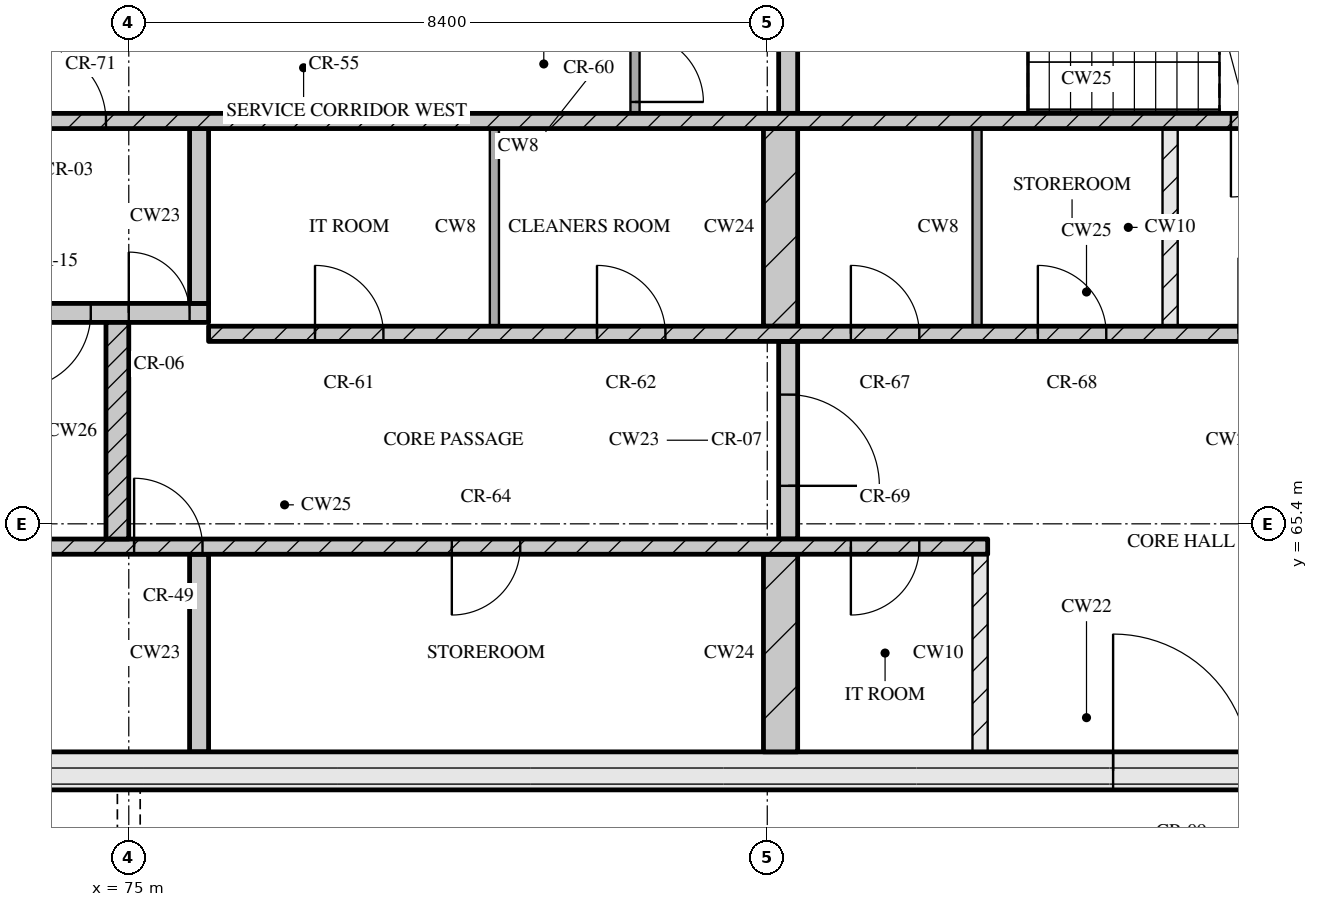
"""IFC4 building model, lengths in metres.
Left out: names, types, materials, properties, quantities, classifications, styles, units other than length and angle.
Written with IfcOpenShell. Run it as: python <this file> out.ifc"""

import sys

from ifc_helpers import new_model, si_unit, direction, frame, frame_2d, origin, place, context, subcontext, project, spatial, rectangle, extrude, element, fill, save


model = new_model("IFC4")
c1 = context("Model", 3, precision=1e-05, world=origin(), true_north=direction((0.0, 1.0)))
c2 = subcontext(c1, "Body", "Model", "MODEL_VIEW")
j1 = project(units=[si_unit("LENGTHUNIT", "METRE"), si_unit("PLANEANGLEUNIT", "RADIAN")], contexts=[c1])
p1 = place(None, origin())
s1 = spatial("IfcSite", under=j1, at=p1, CompositionType="ELEMENT")
p2 = place(p1, origin())
s2 = spatial("IfcBuilding", under=s1, at=p2, CompositionType="ELEMENT")
p3 = place(p2, frame((0.0, 0.0, 263.55)))
s3 = spatial("IfcBuildingStorey", under=s2, at=p3, CompositionType="ELEMENT", Elevation=263.55)
p4 = place(p3, frame((67.3, 62.15, 0.0), z_axis=(0.0, 0.0, 1.0), x_axis=(1.0, 0.0, 0.0)))
e1 = element("IfcWall", 1, at=p4, inside=s3, PredefinedType="SOLIDWALL", context=c2, shape_type="SweptSolid", body=[
    extrude(rectangle(XDim=40.6, YDim=0.5, at=frame_2d((20.3, 0.0))), origin(), (0.0, 0.0, 1.0), 3.32),
])
p5 = place(p4, frame((20.65, 0.0, 0.0)))
e2 = element("IfcOpeningElement", 2, at=p5, cuts=e1, PredefinedType="OPENING", context=c2, shape_type="SweptSolid", body=[
    extrude(rectangle(XDim=1.8, YDim=2.1, at=frame_2d((0.9, 1.05))), frame((0.0, 0.26, 0.0), z_axis=(0.0, -1.0, 0.0), x_axis=(1.0, 0.0, 0.0)), (0.0, 0.0, 1.0), 0.52),
])
p6 = place(p3, frame((75.925, 62.4, 0.0), z_axis=(0.0, 0.0, 1.0), x_axis=(0.0, 1.0, 0.0)))
e3 = element("IfcWall", 3, at=p6, inside=s3, PredefinedType="SOLIDWALL", context=c2, shape_type="SweptSolid", body=[
    extrude(rectangle(XDim=2.6, YDim=0.25, at=frame_2d((1.3, 0.0))), origin(), (0.0, 0.0, 1.0), 3.32),
])
p7 = place(p3, frame((83.575, 62.4, 0.0), z_axis=(0.0, 0.0, 1.0), x_axis=(0.0, 1.0, 0.0)))
e4 = element("IfcWall", 4, at=p7, inside=s3, PredefinedType="SOLIDWALL", context=c2, shape_type="SweptSolid", body=[
    extrude(rectangle(XDim=2.6, YDim=0.45, at=frame_2d((1.3, 0.0))), origin(), (0.0, 0.0, 1.0), 3.32),
])
p8 = place(p3, frame((86.2, 62.4, 0.0), z_axis=(0.0, 0.0, 1.0), x_axis=(0.0, 1.0, 0.0)))
e5 = element("IfcWall", 5, at=p8, inside=s3, PredefinedType="PARTITIONING", context=c2, shape_type="SweptSolid", body=[
    extrude(rectangle(XDim=2.6, YDim=0.2, at=frame_2d((1.3, 0.0))), origin(), (0.0, 0.0, 1.0), 3.32),
])
p9 = place(p3, frame((67.8, 65.1, 0.0), z_axis=(0.0, 0.0, 1.0), x_axis=(1.0, 0.0, 0.0)))
e6 = element("IfcWall", 6, at=p9, inside=s3, PredefinedType="SOLIDWALL", context=c2, shape_type="SweptSolid", body=[
    extrude(rectangle(XDim=18.5, YDim=0.2, at=frame_2d((9.25, 0.0))), origin(), (0.0, 0.0, 1.0), 3.32),
])
p10 = place(p9, frame((7.27, 0.0, 0.0)))
e7 = element("IfcOpeningElement", 7, at=p10, cuts=e6, PredefinedType="OPENING", context=c2, shape_type="SweptSolid", body=[
    extrude(rectangle(XDim=0.9, YDim=2.1, at=frame_2d((0.45, 1.05))), frame((0.0, 0.11, 0.0), z_axis=(0.0, -1.0, 0.0), x_axis=(1.0, 0.0, 0.0)), (0.0, 0.0, 1.0), 0.22),
])
p11 = place(p9, frame((11.45, 0.0, 0.0)))
e8 = element("IfcOpeningElement", 8, at=p11, cuts=e6, PredefinedType="OPENING", context=c2, shape_type="SweptSolid", body=[
    extrude(rectangle(XDim=0.9, YDim=2.1, at=frame_2d((0.45, 1.05))), frame((0.0, 0.11, 0.0), z_axis=(0.0, -1.0, 0.0), x_axis=(1.0, 0.0, 0.0)), (0.0, 0.0, 1.0), 0.22),
])
p12 = place(p9, frame((16.7, 0.0, 0.0)))
e9 = element("IfcOpeningElement", 9, at=p12, cuts=e6, PredefinedType="OPENING", context=c2, shape_type="SweptSolid", body=[
    extrude(rectangle(XDim=0.9, YDim=2.1, at=frame_2d((0.45, 1.05))), frame((0.0, 0.11, 0.0), z_axis=(0.0, -1.0, 0.0), x_axis=(1.0, 0.0, 0.0)), (0.0, 0.0, 1.0), 0.22),
])
p13 = place(p3, frame((74.85, 65.2, 0.0), z_axis=(0.0, 0.0, 1.0), x_axis=(0.0, 1.0, 0.0)))
e10 = element("IfcWall", 10, at=p13, inside=s3, PredefinedType="SOLIDWALL", context=c2, shape_type="SweptSolid", body=[
    extrude(rectangle(XDim=2.85, YDim=0.3, at=frame_2d((1.425, 0.0))), origin(), (0.0, 0.0, 1.0), 3.32),
])
p14 = place(p3, frame((83.675, 65.2, 0.0), z_axis=(0.0, 0.0, 1.0), x_axis=(0.0, 1.0, 0.0)))
e11 = element("IfcWall", 11, at=p14, inside=s3, PredefinedType="SOLIDWALL", context=c2, shape_type="SweptSolid", body=[
    extrude(rectangle(XDim=2.6, YDim=0.25, at=frame_2d((1.3, 0.0))), origin(), (0.0, 0.0, 1.0), 3.32),
])
p15 = place(p14, frame((0.7, 0.0, 0.0)))
e12 = element("IfcOpeningElement", 12, at=p15, cuts=e11, PredefinedType="OPENING", context=c2, shape_type="SweptSolid", body=[
    extrude(rectangle(XDim=1.2, YDim=2.1, at=frame_2d((0.6, 1.05))), frame((0.0, 0.135, 0.0), z_axis=(0.0, -1.0, 0.0), x_axis=(1.0, 0.0, 0.0)), (0.0, 0.0, 1.0), 0.27),
])
p16 = place(p3, frame((76.05, 67.9, 0.0), z_axis=(0.0, 0.0, 1.0), x_axis=(1.0, 0.0, 0.0)))
e13 = element("IfcWall", 13, at=p16, inside=s3, PredefinedType="SOLIDWALL", context=c2, shape_type="SweptSolid", body=[
    extrude(rectangle(XDim=23.1, YDim=0.2, at=frame_2d((11.55, 0.0))), origin(), (0.0, 0.0, 1.0), 3.32),
])
p17 = place(p16, frame((1.4, 0.0, 0.0)))
e14 = element("IfcOpeningElement", 14, at=p17, cuts=e13, PredefinedType="OPENING", context=c2, shape_type="SweptSolid", body=[
    extrude(rectangle(XDim=0.9, YDim=2.1, at=frame_2d((0.45, 1.05))), frame((0.0, 0.11, 0.0), z_axis=(0.0, -1.0, 0.0), x_axis=(1.0, 0.0, 0.0)), (0.0, 0.0, 1.0), 0.22),
])
p18 = place(p16, frame((5.11, 0.0, 0.0)))
e15 = element("IfcOpeningElement", 15, at=p18, cuts=e13, PredefinedType="OPENING", context=c2, shape_type="SweptSolid", body=[
    extrude(rectangle(XDim=0.9, YDim=2.1, at=frame_2d((0.45, 1.05))), frame((0.0, 0.11, 0.0), z_axis=(0.0, -1.0, 0.0), x_axis=(1.0, 0.0, 0.0)), (0.0, 0.0, 1.0), 0.22),
])
p19 = place(p16, frame((8.45, 0.0, 0.0)))
e16 = element("IfcOpeningElement", 16, at=p19, cuts=e13, PredefinedType="OPENING", context=c2, shape_type="SweptSolid", body=[
    extrude(rectangle(XDim=0.9, YDim=2.1, at=frame_2d((0.45, 1.05))), frame((0.0, 0.11, 0.0), z_axis=(0.0, -1.0, 0.0), x_axis=(1.0, 0.0, 0.0)), (0.0, 0.0, 1.0), 0.22),
])
p20 = place(p16, frame((10.91, 0.0, 0.0)))
e17 = element("IfcOpeningElement", 17, at=p20, cuts=e13, PredefinedType="OPENING", context=c2, shape_type="SweptSolid", body=[
    extrude(rectangle(XDim=0.9, YDim=2.1, at=frame_2d((0.45, 1.05))), frame((0.0, 0.11, 0.0), z_axis=(0.0, -1.0, 0.0), x_axis=(1.0, 0.0, 0.0)), (0.0, 0.0, 1.0), 0.22),
])
p21 = place(p16, frame((13.55, 0.0, 0.0)))
e18 = element("IfcOpeningElement", 18, at=p21, cuts=e13, PredefinedType="OPENING", context=c2, shape_type="SweptSolid", body=[
    extrude(rectangle(XDim=1.0, YDim=2.1, at=frame_2d((0.5, 1.05))), frame((0.0, 0.11, 0.0), z_axis=(0.0, -1.0, 0.0), x_axis=(1.0, 0.0, 0.0)), (0.0, 0.0, 1.0), 0.22),
])
p22 = place(p16, frame((16.2, 0.0, 0.0)))
e19 = element("IfcOpeningElement", 19, at=p22, cuts=e13, PredefinedType="OPENING", context=c2, shape_type="SweptSolid", body=[
    extrude(rectangle(XDim=1.1, YDim=2.1, at=frame_2d((0.55, 1.05))), frame((0.0, 0.11, 0.0), z_axis=(0.0, -1.0, 0.0), x_axis=(1.0, 0.0, 0.0)), (0.0, 0.0, 1.0), 0.22),
])
p23 = place(p16, frame((18.7, 0.0, 0.0)))
e20 = element("IfcOpeningElement", 20, at=p23, cuts=e13, PredefinedType="OPENING", context=c2, shape_type="SweptSolid", body=[
    extrude(rectangle(XDim=1.1, YDim=2.1, at=frame_2d((0.55, 1.05))), frame((0.0, 0.11, 0.0), z_axis=(0.0, -1.0, 0.0), x_axis=(1.0, 0.0, 0.0)), (0.0, 0.0, 1.0), 0.22),
])
p24 = place(p16, frame((21.2, 0.0, 0.0)))
e21 = element("IfcOpeningElement", 21, at=p24, cuts=e13, PredefinedType="OPENING", context=c2, shape_type="SweptSolid", body=[
    extrude(rectangle(XDim=1.1, YDim=2.1, at=frame_2d((0.55, 1.05))), frame((0.0, 0.11, 0.0), z_axis=(0.0, -1.0, 0.0), x_axis=(1.0, 0.0, 0.0)), (0.0, 0.0, 1.0), 0.22),
])
p25 = place(p3, frame((79.81, 68.0, 0.0), z_axis=(0.0, 0.0, 1.0), x_axis=(0.0, 1.0, 0.0)))
e22 = element("IfcWall", 22, at=p25, inside=s3, PredefinedType="PARTITIONING", context=c2, shape_type="SweptSolid", body=[
    extrude(rectangle(XDim=2.6, YDim=0.12, at=frame_2d((1.3, 0.0))), origin(), (0.0, 0.0, 1.0), 3.32),
])
p26 = place(p3, frame((83.575, 68.0, 0.0), z_axis=(0.0, 0.0, 1.0), x_axis=(0.0, 1.0, 0.0)))
e23 = element("IfcWall", 23, at=p26, inside=s3, PredefinedType="SOLIDWALL", context=c2, shape_type="SweptSolid", body=[
    extrude(rectangle(XDim=2.6, YDim=0.45, at=frame_2d((1.3, 0.0))), origin(), (0.0, 0.0, 1.0), 3.32),
])
p27 = place(p3, frame((86.16, 68.0, 0.0), z_axis=(0.0, 0.0, 1.0), x_axis=(0.0, 1.0, 0.0)))
e24 = element("IfcWall", 24, at=p27, inside=s3, PredefinedType="PARTITIONING", context=c2, shape_type="SweptSolid", body=[
    extrude(rectangle(XDim=2.6, YDim=0.12, at=frame_2d((1.3, 0.0))), origin(), (0.0, 0.0, 1.0), 3.32),
])
p28 = place(p3, frame((88.7, 68.0, 0.0), z_axis=(0.0, 0.0, 1.0), x_axis=(0.0, 1.0, 0.0)))
e25 = element("IfcWall", 25, at=p28, inside=s3, PredefinedType="PARTITIONING", context=c2, shape_type="SweptSolid", body=[
    extrude(rectangle(XDim=2.6, YDim=0.2, at=frame_2d((1.3, 0.0))), origin(), (0.0, 0.0, 1.0), 3.32),
])
p29 = place(p3, frame((67.8, 68.175, 0.0), z_axis=(0.0, 0.0, 1.0), x_axis=(1.0, 0.0, 0.0)))
e26 = element("IfcWall", 26, at=p29, inside=s3, PredefinedType="SOLIDWALL", context=c2, shape_type="SweptSolid", body=[
    extrude(rectangle(XDim=8.25, YDim=0.25, at=frame_2d((4.125, 0.0))), origin(), (0.0, 0.0, 1.0), 3.32),
])
p30 = place(p29, frame((5.7, 0.0, 0.0)))
e27 = element("IfcOpeningElement", 27, at=p30, cuts=e26, PredefinedType="OPENING", context=c2, shape_type="SweptSolid", body=[
    extrude(rectangle(XDim=1.0, YDim=2.1, at=frame_2d((0.5, 1.05))), frame((0.0, 0.135, 0.0), z_axis=(0.0, -1.0, 0.0), x_axis=(1.0, 0.0, 0.0)), (0.0, 0.0, 1.0), 0.27),
])
p31 = place(p29, frame((7.2, 0.0, 0.0)))
e28 = element("IfcOpeningElement", 28, at=p31, cuts=e26, PredefinedType="OPENING", context=c2, shape_type="SweptSolid", body=[
    extrude(rectangle(XDim=0.8, YDim=2.1, at=frame_2d((0.4, 1.05))), frame((0.0, 0.135, 0.0), z_axis=(0.0, -1.0, 0.0), x_axis=(1.0, 0.0, 0.0)), (0.0, 0.0, 1.0), 0.27),
])
p32 = place(p3, frame((75.925, 68.3, 0.0), z_axis=(0.0, 0.0, 1.0), x_axis=(0.0, 1.0, 0.0)))
e29 = element("IfcWall", 29, at=p32, inside=s3, PredefinedType="SOLIDWALL", context=c2, shape_type="SweptSolid", body=[
    extrude(rectangle(XDim=2.3, YDim=0.25, at=frame_2d((1.15, 0.0))), origin(), (0.0, 0.0, 1.0), 3.32),
])
p33 = place(p3, frame((67.8, 70.7, 0.0), z_axis=(0.0, 0.0, 1.0), x_axis=(1.0, 0.0, 0.0)))
e30 = element("IfcWall", 30, at=p33, inside=s3, PredefinedType="SOLIDWALL", context=c2, shape_type="SweptSolid", body=[
    extrude(rectangle(XDim=39.6, YDim=0.2, at=frame_2d((19.8, 0.0))), origin(), (0.0, 0.0, 1.0), 3.32),
])
p34 = place(p33, frame((0.65, 0.0, 0.0)))
e31 = element("IfcOpeningElement", 31, at=p34, cuts=e30, PredefinedType="OPENING", context=c2, shape_type="SweptSolid", body=[
    extrude(rectangle(XDim=1.1, YDim=2.1, at=frame_2d((0.55, 1.05))), frame((0.0, 0.11, 0.0), z_axis=(0.0, -1.0, 0.0), x_axis=(1.0, 0.0, 0.0)), (0.0, 0.0, 1.0), 0.22),
])
p35 = place(p33, frame((3.25, 0.0, 0.0)))
e32 = element("IfcOpeningElement", 32, at=p35, cuts=e30, PredefinedType="OPENING", context=c2, shape_type="SweptSolid", body=[
    extrude(rectangle(XDim=1.1, YDim=2.1, at=frame_2d((0.55, 1.05))), frame((0.0, 0.11, 0.0), z_axis=(0.0, -1.0, 0.0), x_axis=(1.0, 0.0, 0.0)), (0.0, 0.0, 1.0), 0.22),
])
p36 = place(p33, frame((5.9, 0.0, 0.0)))
e33 = element("IfcOpeningElement", 33, at=p36, cuts=e30, PredefinedType="OPENING", context=c2, shape_type="SweptSolid", body=[
    extrude(rectangle(XDim=1.0, YDim=2.1, at=frame_2d((0.5, 1.05))), frame((0.0, 0.11, 0.0), z_axis=(0.0, -1.0, 0.0), x_axis=(1.0, 0.0, 0.0)), (0.0, 0.0, 1.0), 0.22),
])
p37 = place(p33, frame((21.7, 0.0, 0.0)))
e34 = element("IfcOpeningElement", 34, at=p37, cuts=e30, PredefinedType="OPENING", context=c2, shape_type="SweptSolid", body=[
    extrude(rectangle(XDim=1.0, YDim=2.1, at=frame_2d((0.5, 1.05))), frame((0.0, 0.11, 0.0), z_axis=(0.0, -1.0, 0.0), x_axis=(1.0, 0.0, 0.0)), (0.0, 0.0, 1.0), 0.22),
])
p38 = place(p33, frame((32.7, 0.0, 0.0)))
e35 = element("IfcOpeningElement", 35, at=p38, cuts=e30, PredefinedType="OPENING", context=c2, shape_type="SweptSolid", body=[
    extrude(rectangle(XDim=1.0, YDim=2.1, at=frame_2d((0.5, 1.05))), frame((0.0, 0.11, 0.0), z_axis=(0.0, -1.0, 0.0), x_axis=(1.0, 0.0, 0.0)), (0.0, 0.0, 1.0), 0.22),
])
p39 = place(p33, frame((35.25, 0.0, 0.0)))
e36 = element("IfcOpeningElement", 36, at=p39, cuts=e30, PredefinedType="OPENING", context=c2, shape_type="SweptSolid", body=[
    extrude(rectangle(XDim=1.1, YDim=2.1, at=frame_2d((0.55, 1.05))), frame((0.0, 0.11, 0.0), z_axis=(0.0, -1.0, 0.0), x_axis=(1.0, 0.0, 0.0)), (0.0, 0.0, 1.0), 0.22),
])
p40 = place(p33, frame((37.85, 0.0, 0.0)))
e37 = element("IfcOpeningElement", 37, at=p40, cuts=e30, PredefinedType="OPENING", context=c2, shape_type="SweptSolid", body=[
    extrude(rectangle(XDim=1.1, YDim=2.1, at=frame_2d((0.55, 1.05))), frame((0.0, 0.11, 0.0), z_axis=(0.0, -1.0, 0.0), x_axis=(1.0, 0.0, 0.0)), (0.0, 0.0, 1.0), 0.22),
])
p41 = place(p3, frame((81.66, 70.8, 0.0), z_axis=(0.0, 0.0, 1.0), x_axis=(0.0, 1.0, 0.0)))
e38 = element("IfcWall", 38, at=p41, inside=s3, PredefinedType="PARTITIONING", context=c2, shape_type="SweptSolid", body=[
    extrude(rectangle(XDim=1.2, YDim=0.12, at=frame_2d((0.6, 0.0))), origin(), (0.0, 0.0, 1.0), 3.32),
])
p42 = place(p41, frame((0.15, 0.0, 0.0)))
e39 = element("IfcOpeningElement", 39, at=p42, cuts=e38, PredefinedType="OPENING", context=c2, shape_type="SweptSolid", body=[
    extrude(rectangle(XDim=0.9, YDim=2.1, at=frame_2d((0.45, 1.05))), frame((0.0, 0.07, 0.0), z_axis=(0.0, -1.0, 0.0), x_axis=(1.0, 0.0, 0.0)), (0.0, 0.0, 1.0), 0.14),
])
p43 = place(p3, frame((83.675, 70.8, 0.0), z_axis=(0.0, 0.0, 1.0), x_axis=(0.0, 1.0, 0.0)))
e40 = element("IfcWall", 40, at=p43, inside=s3, PredefinedType="SOLIDWALL", context=c2, shape_type="SweptSolid", body=[
    extrude(rectangle(XDim=2.95, YDim=0.25, at=frame_2d((1.475, 0.0))), origin(), (0.0, 0.0, 1.0), 3.32),
])
p44 = place(p5, origin())
e41 = element("IfcDoor", 41, at=p44, inside=s3, OperationType="DOUBLE_DOOR_SINGLE_SWING", PredefinedType="DOOR", context=c2, shape_type="SweptSolid", body=[
    extrude(rectangle(XDim=1.8, YDim=2.1, at=frame_2d((0.9, 1.05))), frame((0.0, 0.025, 0.0), z_axis=(0.0, -1.0, 0.0), x_axis=(1.0, 0.0, 0.0)), (0.0, 0.0, 1.0), 0.05),
])
fill(e2, e41)
p45 = place(p10, origin())
e42 = element("IfcDoor", 42, at=p45, inside=s3, OperationType="SINGLE_SWING_LEFT", PredefinedType="DOOR", context=c2, shape_type="SweptSolid", body=[
    extrude(rectangle(XDim=0.9, YDim=2.1, at=frame_2d((0.45, 1.05))), frame((0.0, 0.025, 0.0), z_axis=(0.0, -1.0, 0.0), x_axis=(1.0, 0.0, 0.0)), (0.0, 0.0, 1.0), 0.05),
])
fill(e7, e42)
p46 = place(p11, origin())
e43 = element("IfcDoor", 43, at=p46, inside=s3, OperationType="SINGLE_SWING_RIGHT", PredefinedType="DOOR", context=c2, shape_type="SweptSolid", body=[
    extrude(rectangle(XDim=0.9, YDim=2.1, at=frame_2d((0.45, 1.05))), frame((0.0, 0.025, 0.0), z_axis=(0.0, -1.0, 0.0), x_axis=(1.0, 0.0, 0.0)), (0.0, 0.0, 1.0), 0.05),
])
fill(e8, e43)
p47 = place(p12, origin())
e44 = element("IfcDoor", 44, at=p47, inside=s3, OperationType="SINGLE_SWING_RIGHT", PredefinedType="DOOR", context=c2, shape_type="SweptSolid", body=[
    extrude(rectangle(XDim=0.9, YDim=2.1, at=frame_2d((0.45, 1.05))), frame((0.0, 0.025, 0.0), z_axis=(0.0, -1.0, 0.0), x_axis=(1.0, 0.0, 0.0)), (0.0, 0.0, 1.0), 0.05),
])
fill(e9, e44)
p48 = place(p15, origin())
e45 = element("IfcDoor", 45, at=p48, inside=s3, OperationType="SINGLE_SWING_RIGHT", PredefinedType="DOOR", context=c2, shape_type="SweptSolid", body=[
    extrude(rectangle(XDim=1.2, YDim=2.1, at=frame_2d((0.6, 1.05))), frame((0.0, 0.025, 0.0), z_axis=(0.0, -1.0, 0.0), x_axis=(1.0, 0.0, 0.0)), (0.0, 0.0, 1.0), 0.05),
])
fill(e12, e45)
p49 = place(p17, origin())
e46 = element("IfcDoor", 46, at=p49, inside=s3, OperationType="SINGLE_SWING_LEFT", PredefinedType="DOOR", context=c2, shape_type="SweptSolid", body=[
    extrude(rectangle(XDim=0.9, YDim=2.1, at=frame_2d((0.45, 1.05))), frame((0.0, 0.025, 0.0), z_axis=(0.0, -1.0, 0.0), x_axis=(1.0, 0.0, 0.0)), (0.0, 0.0, 1.0), 0.05),
])
fill(e14, e46)
p50 = place(p18, origin())
e47 = element("IfcDoor", 47, at=p50, inside=s3, OperationType="SINGLE_SWING_LEFT", PredefinedType="DOOR", context=c2, shape_type="SweptSolid", body=[
    extrude(rectangle(XDim=0.9, YDim=2.1, at=frame_2d((0.45, 1.05))), frame((0.0, 0.025, 0.0), z_axis=(0.0, -1.0, 0.0), x_axis=(1.0, 0.0, 0.0)), (0.0, 0.0, 1.0), 0.05),
])
fill(e15, e47)
p51 = place(p19, origin())
e48 = element("IfcDoor", 48, at=p51, inside=s3, OperationType="SINGLE_SWING_LEFT", PredefinedType="DOOR", context=c2, shape_type="SweptSolid", body=[
    extrude(rectangle(XDim=0.9, YDim=2.1, at=frame_2d((0.45, 1.05))), frame((0.0, 0.025, 0.0), z_axis=(0.0, -1.0, 0.0), x_axis=(1.0, 0.0, 0.0)), (0.0, 0.0, 1.0), 0.05),
])
fill(e16, e48)
p52 = place(p20, origin())
e49 = element("IfcDoor", 49, at=p52, inside=s3, OperationType="SINGLE_SWING_LEFT", PredefinedType="DOOR", context=c2, shape_type="SweptSolid", body=[
    extrude(rectangle(XDim=0.9, YDim=2.1, at=frame_2d((0.45, 1.05))), frame((0.0, 0.025, 0.0), z_axis=(0.0, -1.0, 0.0), x_axis=(1.0, 0.0, 0.0)), (0.0, 0.0, 1.0), 0.05),
])
fill(e17, e49)
p53 = place(p30, origin())
e50 = element("IfcDoor", 50, at=p53, inside=s3, OperationType="SINGLE_SWING_RIGHT", PredefinedType="DOOR", context=c2, shape_type="SweptSolid", body=[
    extrude(rectangle(XDim=1.0, YDim=2.1, at=frame_2d((0.5, 1.05))), frame((0.0, 0.025, 0.0), z_axis=(0.0, -1.0, 0.0), x_axis=(1.0, 0.0, 0.0)), (0.0, 0.0, 1.0), 0.05),
])
fill(e27, e50)
p54 = place(p31, origin())
e51 = element("IfcDoor", 51, at=p54, inside=s3, OperationType="SINGLE_SWING_LEFT", PredefinedType="DOOR", context=c2, shape_type="SweptSolid", body=[
    extrude(rectangle(XDim=0.8, YDim=2.1, at=frame_2d((0.4, 1.05))), frame((0.0, 0.025, 0.0), z_axis=(0.0, -1.0, 0.0), x_axis=(1.0, 0.0, 0.0)), (0.0, 0.0, 1.0), 0.05),
])
fill(e28, e51)
p55 = place(p36, origin())
e52 = element("IfcDoor", 52, at=p55, inside=s3, OperationType="SINGLE_SWING_LEFT", PredefinedType="DOOR", context=c2, shape_type="SweptSolid", body=[
    extrude(rectangle(XDim=1.0, YDim=2.1, at=frame_2d((0.5, 1.05))), frame((0.0, 0.025, 0.0), z_axis=(0.0, -1.0, 0.0), x_axis=(1.0, 0.0, 0.0)), (0.0, 0.0, 1.0), 0.05),
])
fill(e33, e52)
p56 = place(p37, origin())
e53 = element("IfcDoor", 53, at=p56, inside=s3, OperationType="SINGLE_SWING_RIGHT", PredefinedType="DOOR", context=c2, shape_type="SweptSolid", body=[
    extrude(rectangle(XDim=1.0, YDim=2.1, at=frame_2d((0.5, 1.05))), frame((0.0, 0.025, 0.0), z_axis=(0.0, -1.0, 0.0), x_axis=(1.0, 0.0, 0.0)), (0.0, 0.0, 1.0), 0.05),
])
fill(e34, e53)
p57 = place(p42, origin())
e54 = element("IfcDoor", 54, at=p57, inside=s3, OperationType="SINGLE_SWING_RIGHT", PredefinedType="DOOR", context=c2, shape_type="SweptSolid", body=[
    extrude(rectangle(XDim=0.9, YDim=2.1, at=frame_2d((0.45, 1.05))), frame((0.0, 0.025, 0.0), z_axis=(0.0, -1.0, 0.0), x_axis=(1.0, 0.0, 0.0)), (0.0, 0.0, 1.0), 0.05),
])
fill(e39, e54)
save(model, sys.argv[1])
